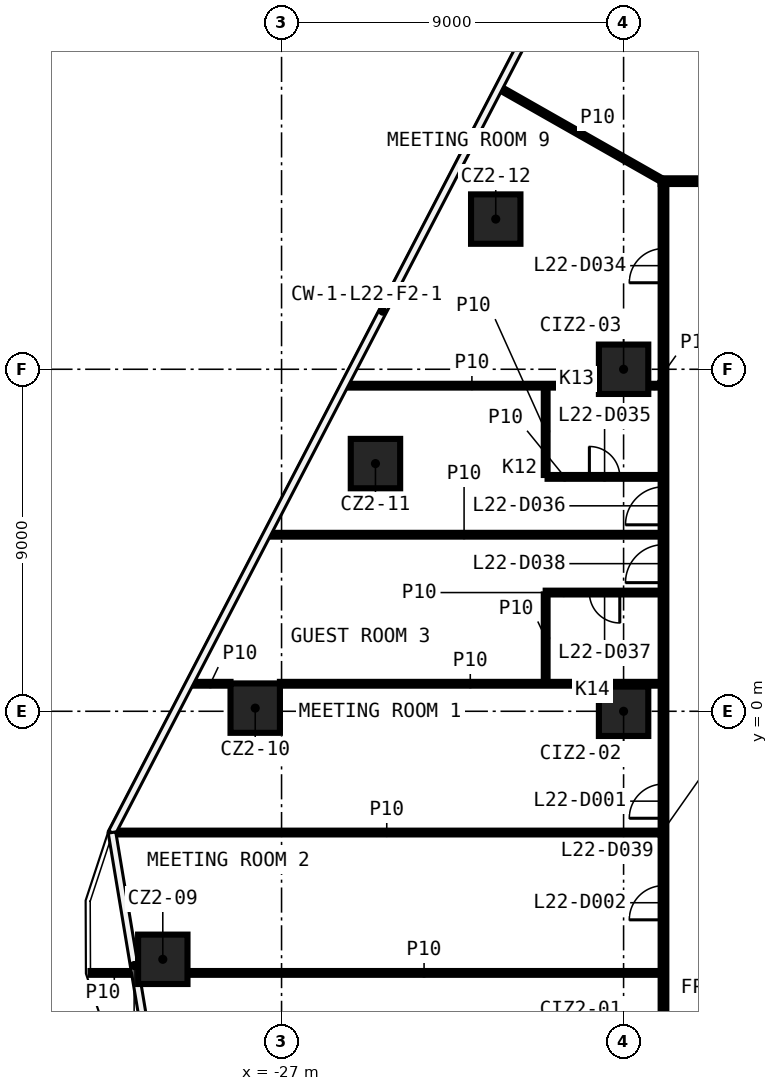
"""IFC4 building model, lengths in metres.
Left out: names, types, materials, properties, quantities, classifications, styles, units other than length and angle.
Written with IfcOpenShell. Run it as: python <this file> out.ifc"""

import sys

from ifc_helpers import new_model, si_unit, direction, frame, frame_2d, origin, origin_2d, place, context, subcontext, project, spatial, rectangle, extrude, element, fill, save


model = new_model("IFC4")
c1 = context("Model", 3, precision=1e-05, world=origin(), true_north=direction((0.0, 1.0)))
c2 = subcontext(c1, "Body", "Model", "MODEL_VIEW")
j1 = project(units=[si_unit("LENGTHUNIT", "METRE"), si_unit("PLANEANGLEUNIT", "RADIAN")], contexts=[c1])
p1 = place(None, origin())
s1 = spatial("IfcSite", under=j1, at=p1, CompositionType="ELEMENT")
p2 = place(p1, origin())
s2 = spatial("IfcBuilding", under=s1, at=p2, CompositionType="ELEMENT")
p3 = place(p2, frame((0.0, 0.0, 106.3)))
s3 = spatial("IfcBuildingStorey", under=s2, at=p3, CompositionType="ELEMENT", Elevation=106.3)
for number, where, z_axis, x_axis in (
    (1, (-30.125, -6.527, 0.0), (0.0, 0.0, 1.0), (1.0, 0.0, 0.0)),
    (2, (-27.693, 0.083, 0.0), (0.0, 0.0, 1.0), (1.0, 0.0, 0.0)),
    (3, (-24.529, 6.518, 0.0), (0.0, 0.0, 1.0), (1.0, 0.0, 0.0)),
    (4, (-21.364, 12.952, 0.0), (0.0, 0.0, 1.0), (1.0, 0.0, 0.0)),
    (5, (-18.0, 0.0, 0.0), (0.0, 0.0, 1.0), (1.0, 0.0, 0.0)),
    (6, (-18.0, 9.0, 0.0), (0.0, 0.0, 1.0), (1.0, 0.0, 0.0)),
):
    element("IfcColumn", number, at=place(p3, frame(where, z_axis=z_axis, x_axis=x_axis)), inside=s3, PredefinedType="COLUMN", context=c2, shape_type="SweptSolid", body=[
        extrude(rectangle(XDim=1.3, YDim=1.3, at=origin_2d()), origin(), (0.0, 0.0, 1.0), 3.3),
    ])
p4 = place(p3, frame((-32.027, -6.885, 0.0), z_axis=(0.0, 0.0, 1.0), x_axis=(1.0, 0.0, 0.0)))
e7 = element("IfcWall", 7, at=p4, inside=s3, PredefinedType="PARTITIONING", context=c2, shape_type="SweptSolid", body=[
    extrude(rectangle(XDim=1.252, YDim=0.1, at=frame_2d((0.626, 0.0))), origin(), (0.0, 0.0, 1.0), 3.3),
])
p5 = place(p3, frame((-29.475, -6.885, 0.0), z_axis=(0.0, 0.0, 1.0), x_axis=(1.0, 0.0, 0.0)))
e8 = element("IfcWall", 8, at=p5, inside=s3, PredefinedType="PARTITIONING", context=c2, shape_type="SweptSolid", body=[
    extrude(rectangle(XDim=12.45, YDim=0.1, at=frame_2d((6.225, 0.0))), origin(), (0.0, 0.0, 1.0), 3.3),
])
p6 = place(p3, frame((-31.439, -3.191, 0.0), z_axis=(0.0, 0.0, 1.0), x_axis=(1.0, 0.0, 0.0)))
e9 = element("IfcWall", 9, at=p6, inside=s3, PredefinedType="PARTITIONING", context=c2, shape_type="SweptSolid", body=[
    extrude(rectangle(XDim=14.414, YDim=0.1, at=frame_2d((7.207, 0.0))), origin(), (0.0, 0.0, 1.0), 3.3),
])
p7 = place(p3, frame((-29.406, 0.724, 0.0), z_axis=(0.0, 0.0, 1.0), x_axis=(1.0, 0.0, 0.0)))
e10 = element("IfcWall", 10, at=p7, inside=s3, PredefinedType="PARTITIONING", context=c2, shape_type="SweptSolid", body=[
    extrude(rectangle(XDim=1.063, YDim=0.1, at=frame_2d((0.531, 0.0))), origin(), (0.0, 0.0, 1.0), 3.3),
])
p8 = place(p3, frame((-27.043, 0.724, 0.0), z_axis=(0.0, 0.0, 1.0), x_axis=(1.0, 0.0, 0.0)))
e11 = element("IfcWall", 11, at=p8, inside=s3, PredefinedType="PARTITIONING", context=c2, shape_type="SweptSolid", body=[
    extrude(rectangle(XDim=10.018, YDim=0.1, at=frame_2d((5.009, 0.0))), origin(), (0.0, 0.0, 1.0), 3.3),
])
p9 = place(p3, frame((-17.025, 3.124, 0.0), z_axis=(0.0, 0.0, 1.0), x_axis=(-1.0, 0.0, 0.0)))
e12 = element("IfcWall", 12, at=p9, inside=s3, PredefinedType="PARTITIONING", context=c2, shape_type="SweptSolid", body=[
    extrude(rectangle(XDim=3.025, YDim=0.1, at=frame_2d((1.513, 0.0))), origin(), (0.0, 0.0, 1.0), 3.3),
])
p10 = place(p9, frame((1.075, 0.0, 0.0)))
e13 = element("IfcOpeningElement", 13, at=p10, cuts=e12, PredefinedType="OPENING", context=c2, shape_type="SweptSolid", body=[
    extrude(rectangle(XDim=0.8, YDim=2.1, at=frame_2d((0.4, 1.05))), frame((0.0, 0.06, 0.0), z_axis=(0.0, -1.0, 0.0), x_axis=(1.0, 0.0, 0.0)), (0.0, 0.0, 1.0), 0.12),
])
p11 = place(p3, frame((-27.369, 4.646, 0.0), z_axis=(0.0, 0.0, 1.0), x_axis=(1.0, 0.0, 0.0)))
e14 = element("IfcWall", 14, at=p11, inside=s3, PredefinedType="PARTITIONING", context=c2, shape_type="SweptSolid", body=[
    extrude(rectangle(XDim=10.344, YDim=0.1, at=frame_2d((5.172, 0.0))), origin(), (0.0, 0.0, 1.0), 3.3),
])
p12 = place(p3, frame((-20.0, 6.168, 0.0), z_axis=(0.0, 0.0, 1.0), x_axis=(1.0, 0.0, 0.0)))
e15 = element("IfcWall", 15, at=p12, inside=s3, PredefinedType="PARTITIONING", context=c2, shape_type="SweptSolid", body=[
    extrude(rectangle(XDim=2.975, YDim=0.1, at=frame_2d((1.488, 0.0))), origin(), (0.0, 0.0, 1.0), 3.3),
])
p13 = place(p12, frame((1.1, 0.0, 0.0)))
e16 = element("IfcOpeningElement", 16, at=p13, cuts=e15, PredefinedType="OPENING", context=c2, shape_type="SweptSolid", body=[
    extrude(rectangle(XDim=0.8, YDim=2.1, at=frame_2d((0.4, 1.05))), frame((0.0, 0.06, 0.0), z_axis=(0.0, -1.0, 0.0), x_axis=(1.0, 0.0, 0.0)), (0.0, 0.0, 1.0), 0.12),
])
p14 = place(p3, frame((-25.333, 8.568, 0.0), z_axis=(0.0, 0.0, 1.0), x_axis=(1.0, 0.0, 0.0)))
e17 = element("IfcWall", 17, at=p14, inside=s3, PredefinedType="PARTITIONING", context=c2, shape_type="SweptSolid", body=[
    extrude(rectangle(XDim=6.683, YDim=0.1, at=frame_2d((3.341, 0.0))), origin(), (0.0, 0.0, 1.0), 3.3),
])
p15 = place(p3, frame((-17.35, 8.568, 0.0), z_axis=(0.0, 0.0, 1.0), x_axis=(1.0, 0.0, 0.0)))
e18 = element("IfcWall", 18, at=p15, inside=s3, PredefinedType="PARTITIONING", context=c2, shape_type="SweptSolid", body=[
    extrude(rectangle(XDim=0.325, YDim=0.1, at=frame_2d((0.163, 0.0))), origin(), (0.0, 0.0, 1.0), 3.3),
])
p16 = place(p3, frame((-17.025, 13.95, 0.0), z_axis=(0.0, 0.0, 1.0), x_axis=(1.0, 0.0, 0.0)))
e19 = element("IfcWall", 19, at=p16, inside=s3, PredefinedType="PARTITIONING", context=c2, shape_type="SweptSolid", body=[
    extrude(rectangle(XDim=34.05, YDim=0.15, at=frame_2d((17.025, 0.0))), origin(), (0.0, 0.0, 1.0), 3.3),
])
p17 = place(p16, frame((29.735, 0.0, 0.0)))
e20 = element("IfcOpeningElement", 20, at=p17, cuts=e19, PredefinedType="OPENING", context=c2, shape_type="SweptSolid", body=[
    extrude(rectangle(XDim=1.0, YDim=2.1, at=frame_2d((0.5, 1.05))), frame((0.0, 0.085, 0.0), z_axis=(0.0, -1.0, 0.0), x_axis=(1.0, 0.0, 0.0)), (0.0, 0.0, 1.0), 0.17),
])
p18 = place(p16, frame((25.513, 0.0, 0.0)))
e21 = element("IfcOpeningElement", 21, at=p18, cuts=e19, PredefinedType="OPENING", context=c2, shape_type="SweptSolid", body=[
    extrude(rectangle(XDim=1.0, YDim=2.1, at=frame_2d((0.5, 1.05))), frame((0.0, 0.085, 0.0), z_axis=(0.0, -1.0, 0.0), x_axis=(1.0, 0.0, 0.0)), (0.0, 0.0, 1.0), 0.17),
])
p19 = place(p16, frame((18.631, 0.0, 0.0)))
e22 = element("IfcOpeningElement", 22, at=p19, cuts=e19, PredefinedType="OPENING", context=c2, shape_type="SweptSolid", body=[
    extrude(rectangle(XDim=1.0, YDim=2.1, at=frame_2d((0.5, 1.05))), frame((0.0, 0.085, 0.0), z_axis=(0.0, -1.0, 0.0), x_axis=(1.0, 0.0, 0.0)), (0.0, 0.0, 1.0), 0.17),
])
p20 = place(p16, frame((16.545, 0.0, 0.0)))
e23 = element("IfcOpeningElement", 23, at=p20, cuts=e19, PredefinedType="OPENING", context=c2, shape_type="SweptSolid", body=[
    extrude(rectangle(XDim=1.0, YDim=2.1, at=frame_2d((0.5, 1.05))), frame((0.0, 0.085, 0.0), z_axis=(0.0, -1.0, 0.0), x_axis=(1.0, 0.0, 0.0)), (0.0, 0.0, 1.0), 0.17),
])
p21 = place(p16, frame((9.659, 0.0, 0.0)))
e24 = element("IfcOpeningElement", 24, at=p21, cuts=e19, PredefinedType="OPENING", context=c2, shape_type="SweptSolid", body=[
    extrude(rectangle(XDim=1.0, YDim=2.1, at=frame_2d((0.5, 1.05))), frame((0.0, 0.085, 0.0), z_axis=(0.0, -1.0, 0.0), x_axis=(1.0, 0.0, 0.0)), (0.0, 0.0, 1.0), 0.17),
])
p22 = place(p16, frame((7.577, 0.0, 0.0)))
e25 = element("IfcOpeningElement", 25, at=p22, cuts=e19, PredefinedType="OPENING", context=c2, shape_type="SweptSolid", body=[
    extrude(rectangle(XDim=1.0, YDim=2.1, at=frame_2d((0.5, 1.05))), frame((0.0, 0.085, 0.0), z_axis=(0.0, -1.0, 0.0), x_axis=(1.0, 0.0, 0.0)), (0.0, 0.0, 1.0), 0.17),
])
p23 = place(p16, frame((2.381, 0.0, 0.0)))
e26 = element("IfcOpeningElement", 26, at=p23, cuts=e19, PredefinedType="OPENING", context=c2, shape_type="SweptSolid", body=[
    extrude(rectangle(XDim=0.9, YDim=2.1, at=frame_2d((0.45, 1.05))), frame((0.0, 0.085, 0.0), z_axis=(0.0, -1.0, 0.0), x_axis=(1.0, 0.0, 0.0)), (0.0, 0.0, 1.0), 0.17),
])
p24 = place(p3, frame((-16.95, -13.875, 0.0), z_axis=(0.0, 0.0, 1.0), x_axis=(0.0, 1.0, 0.0)))
e27 = element("IfcWall", 27, at=p24, inside=s3, PredefinedType="PARTITIONING", context=c2, shape_type="SweptSolid", body=[
    extrude(rectangle(XDim=27.75, YDim=0.15, at=frame_2d((13.875, 0.0))), origin(), (0.0, 0.0, 1.0), 3.3),
])
p25 = place(p24, frame((11.06, 0.0, 0.0)))
e28 = element("IfcOpeningElement", 28, at=p25, cuts=e27, PredefinedType="OPENING", context=c2, shape_type="SweptSolid", body=[
    extrude(rectangle(XDim=0.9, YDim=2.1, at=frame_2d((0.45, 1.05))), frame((0.0, 0.085, 0.0), z_axis=(0.0, -1.0, 0.0), x_axis=(1.0, 0.0, 0.0)), (0.0, 0.0, 1.0), 0.17),
])
p26 = place(p24, frame((8.387, 0.0, 0.0)))
e29 = element("IfcOpeningElement", 29, at=p26, cuts=e27, PredefinedType="OPENING", context=c2, shape_type="SweptSolid", body=[
    extrude(rectangle(XDim=0.9, YDim=2.1, at=frame_2d((0.45, 1.05))), frame((0.0, 0.085, 0.0), z_axis=(0.0, -1.0, 0.0), x_axis=(1.0, 0.0, 0.0)), (0.0, 0.0, 1.0), 0.17),
])
p27 = place(p24, frame((1.666, 0.0, 0.0)))
e30 = element("IfcOpeningElement", 30, at=p27, cuts=e27, PredefinedType="OPENING", context=c2, shape_type="SweptSolid", body=[
    extrude(rectangle(XDim=0.9, YDim=2.1, at=frame_2d((0.45, 1.05))), frame((0.0, 0.085, 0.0), z_axis=(0.0, -1.0, 0.0), x_axis=(1.0, 0.0, 0.0)), (0.0, 0.0, 1.0), 0.17),
])
p28 = place(p24, frame((25.152, 0.0, 0.0)))
e31 = element("IfcOpeningElement", 31, at=p28, cuts=e27, PredefinedType="OPENING", context=c2, shape_type="SweptSolid", body=[
    extrude(rectangle(XDim=0.9, YDim=2.1, at=frame_2d((0.45, 1.05))), frame((0.0, 0.085, 0.0), z_axis=(0.0, -1.0, 0.0), x_axis=(1.0, 0.0, 0.0)), (0.0, 0.0, 1.0), 0.17),
])
p29 = place(p24, frame((18.782, 0.0, 0.0)))
e32 = element("IfcOpeningElement", 32, at=p29, cuts=e27, PredefinedType="OPENING", context=c2, shape_type="SweptSolid", body=[
    extrude(rectangle(XDim=1.0, YDim=2.1, at=frame_2d((0.5, 1.05))), frame((0.0, 0.085, 0.0), z_axis=(0.0, -1.0, 0.0), x_axis=(1.0, 0.0, 0.0)), (0.0, 0.0, 1.0), 0.17),
])
p30 = place(p24, frame((17.26, 0.0, 0.0)))
e33 = element("IfcOpeningElement", 33, at=p30, cuts=e27, PredefinedType="OPENING", context=c2, shape_type="SweptSolid", body=[
    extrude(rectangle(XDim=1.0, YDim=2.1, at=frame_2d((0.5, 1.05))), frame((0.0, 0.085, 0.0), z_axis=(0.0, -1.0, 0.0), x_axis=(1.0, 0.0, 0.0)), (0.0, 0.0, 1.0), 0.17),
])
p31 = place(p3, frame((-20.05, 0.774, 0.0), z_axis=(0.0, 0.0, 1.0), x_axis=(0.0, 1.0, 0.0)))
e34 = element("IfcWall", 34, at=p31, inside=s3, PredefinedType="PARTITIONING", context=c2, shape_type="SweptSolid", body=[
    extrude(rectangle(XDim=2.3, YDim=0.1, at=frame_2d((1.15, 0.0))), origin(), (0.0, 0.0, 1.0), 3.3),
])
p32 = place(p3, frame((-20.05, 6.218, 0.0), z_axis=(0.0, 0.0, 1.0), x_axis=(0.0, 1.0, 0.0)))
e35 = element("IfcWall", 35, at=p32, inside=s3, PredefinedType="PARTITIONING", context=c2, shape_type="SweptSolid", body=[
    extrude(rectangle(XDim=2.3, YDim=0.1, at=frame_2d((1.15, 0.0))), origin(), (0.0, 0.0, 1.0), 3.3),
])
p33 = place(p3, frame((-21.264, 16.401, 0.0), z_axis=(0.0, 0.0, 1.0), x_axis=(0.869409483432, -0.494092248592, 0.0)))
e36 = element("IfcWall", 36, at=p33, inside=s3, PredefinedType="PARTITIONING", context=c2, shape_type="SweptSolid", body=[
    extrude(rectangle(XDim=4.962, YDim=0.1, at=frame_2d((2.481, 0.0))), origin(), (0.0, 0.0, 1.0), 3.3),
])
p34 = place(p25, origin())
e37 = element("IfcDoor", 37, at=p34, inside=s3, OperationType="SINGLE_SWING_RIGHT", PredefinedType="DOOR", context=c2, shape_type="SweptSolid", body=[
    extrude(rectangle(XDim=0.9, YDim=2.1, at=frame_2d((0.45, 1.05))), frame((0.0, 0.025, 0.0), z_axis=(0.0, -1.0, 0.0), x_axis=(1.0, 0.0, 0.0)), (0.0, 0.0, 1.0), 0.05),
])
fill(e28, e37)
p35 = place(p26, origin())
e38 = element("IfcDoor", 38, at=p35, inside=s3, OperationType="SINGLE_SWING_LEFT", PredefinedType="DOOR", context=c2, shape_type="SweptSolid", body=[
    extrude(rectangle(XDim=0.9, YDim=2.1, at=frame_2d((0.45, 1.05))), frame((0.0, 0.025, 0.0), z_axis=(0.0, -1.0, 0.0), x_axis=(1.0, 0.0, 0.0)), (0.0, 0.0, 1.0), 0.05),
])
fill(e29, e38)
p36 = place(p28, origin())
e39 = element("IfcDoor", 39, at=p36, inside=s3, OperationType="SINGLE_SWING_LEFT", PredefinedType="DOOR", context=c2, shape_type="SweptSolid", body=[
    extrude(rectangle(XDim=0.9, YDim=2.1, at=frame_2d((0.45, 1.05))), frame((0.0, 0.025, 0.0), z_axis=(0.0, -1.0, 0.0), x_axis=(1.0, 0.0, 0.0)), (0.0, 0.0, 1.0), 0.05),
])
fill(e31, e39)
p37 = place(p13, origin())
e40 = element("IfcDoor", 40, at=p37, inside=s3, OperationType="SINGLE_SWING_LEFT", PredefinedType="DOOR", context=c2, shape_type="SweptSolid", body=[
    extrude(rectangle(XDim=0.8, YDim=2.1, at=frame_2d((0.4, 1.05))), frame((0.0, 0.025, 0.0), z_axis=(0.0, -1.0, 0.0), x_axis=(1.0, 0.0, 0.0)), (0.0, 0.0, 1.0), 0.05),
])
fill(e16, e40)
p38 = place(p29, origin())
e41 = element("IfcDoor", 41, at=p38, inside=s3, OperationType="SINGLE_SWING_RIGHT", PredefinedType="DOOR", context=c2, shape_type="SweptSolid", body=[
    extrude(rectangle(XDim=1.0, YDim=2.1, at=frame_2d((0.5, 1.05))), frame((0.0, 0.025, 0.0), z_axis=(0.0, -1.0, 0.0), x_axis=(1.0, 0.0, 0.0)), (0.0, 0.0, 1.0), 0.05),
])
fill(e32, e41)
p39 = place(p10, origin())
e42 = element("IfcDoor", 42, at=p39, inside=s3, OperationType="SINGLE_SWING_RIGHT", PredefinedType="DOOR", context=c2, shape_type="SweptSolid", body=[
    extrude(rectangle(XDim=0.8, YDim=2.1, at=frame_2d((0.4, 1.05))), frame((0.0, 0.025, 0.0), z_axis=(0.0, -1.0, 0.0), x_axis=(1.0, 0.0, 0.0)), (0.0, 0.0, 1.0), 0.05),
])
fill(e13, e42)
p40 = place(p30, origin())
e43 = element("IfcDoor", 43, at=p40, inside=s3, OperationType="SINGLE_SWING_LEFT", PredefinedType="DOOR", context=c2, shape_type="SweptSolid", body=[
    extrude(rectangle(XDim=1.0, YDim=2.1, at=frame_2d((0.5, 1.05))), frame((0.0, 0.025, 0.0), z_axis=(0.0, -1.0, 0.0), x_axis=(1.0, 0.0, 0.0)), (0.0, 0.0, 1.0), 0.05),
])
fill(e33, e43)
save(model, sys.argv[1])
